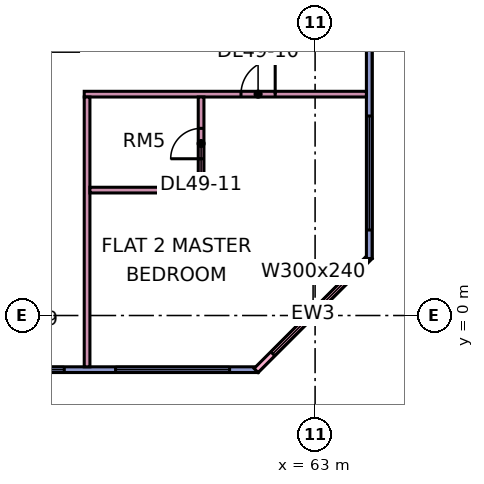
"""IFC4 building model, lengths in metres.
Left out: names, types, materials, properties, quantities, classifications, styles, units other than length and angle.
Written with IfcOpenShell. Run it as: python <this file> out.ifc"""

import sys

from ifc_helpers import new_model, si_unit, direction, frame, frame_2d, origin, place, context, subcontext, project, spatial, rectangle, extrude, element, fill, save


model = new_model("IFC4")
c1 = context("Model", 3, precision=1e-05, world=origin(), true_north=direction((0.0, 1.0)))
c2 = subcontext(c1, "Body", "Model", "MODEL_VIEW")
j1 = project(units=[si_unit("LENGTHUNIT", "METRE"), si_unit("PLANEANGLEUNIT", "RADIAN")], contexts=[c1])
p1 = place(None, origin())
s1 = spatial("IfcSite", under=j1, at=p1, CompositionType="ELEMENT")
p2 = place(p1, origin())
s2 = spatial("IfcBuilding", under=s1, at=p2, CompositionType="ELEMENT")
p3 = place(p2, frame((0.0, 0.0, 211.65)))
s3 = spatial("IfcBuildingStorey", under=s2, at=p3, CompositionType="ELEMENT", Elevation=211.65)
p4 = place(p3, frame((48.075, -1.425, 0.0), z_axis=(0.0, 0.0, 1.0), x_axis=(1.0, 0.0, 0.0)))
e1 = element("IfcWall", 1, at=p4, inside=s3, PredefinedType="SOLIDWALL", context=c2, shape_type="SweptSolid", body=[
    extrude(rectangle(XDim=13.425, YDim=0.15, at=frame_2d((6.712, 0.0))), origin(), (0.0, 0.0, 1.0), 3.35),
])
p5 = place(p4, frame((0.562, 0.0, 0.45)))
e2 = element("IfcOpeningElement", 2, at=p5, cuts=e1, PredefinedType="OPENING", context=c2, shape_type="SweptSolid", body=[
    extrude(rectangle(XDim=1.8, YDim=2.4, at=frame_2d((0.9, 1.2))), frame((0.0, 0.085, 0.0), z_axis=(0.0, -1.0, 0.0), x_axis=(1.0, 0.0, 0.0)), (0.0, 0.0, 1.0), 0.17),
])
p6 = place(p4, frame((3.525, 0.0, 0.45)))
e3 = element("IfcOpeningElement", 3, at=p6, cuts=e1, PredefinedType="OPENING", context=c2, shape_type="SweptSolid", body=[
    extrude(rectangle(XDim=4.8, YDim=2.4, at=frame_2d((2.4, 1.2))), frame((0.0, 0.085, 0.0), z_axis=(0.0, -1.0, 0.0), x_axis=(1.0, 0.0, 0.0)), (0.0, 0.0, 1.0), 0.17),
])
p7 = place(p4, frame((9.675, 0.0, 0.45)))
e4 = element("IfcOpeningElement", 4, at=p7, cuts=e1, PredefinedType="OPENING", context=c2, shape_type="SweptSolid", body=[
    extrude(rectangle(XDim=3.0, YDim=2.4, at=frame_2d((1.5, 1.2))), frame((0.0, 0.085, 0.0), z_axis=(0.0, -1.0, 0.0), x_axis=(1.0, 0.0, 0.0)), (0.0, 0.0, 1.0), 0.17),
])
p8 = place(p3, frame((61.447, -1.447, 0.0), z_axis=(0.0, 0.0, 1.0), x_axis=(0.707106781187, 0.707106781187, 0.0)))
e5 = element("IfcWall", 5, at=p8, inside=s3, PredefinedType="SOLIDWALL", context=c2, shape_type="SweptSolid", body=[
    extrude(rectangle(XDim=4.243, YDim=0.15, at=frame_2d((2.121, 0.0))), origin(), (0.0, 0.0, 1.0), 3.35),
])
p9 = place(p8, frame((0.621, 0.0, 0.45)))
e6 = element("IfcOpeningElement", 6, at=p9, cuts=e5, PredefinedType="OPENING", context=c2, shape_type="SweptSolid", body=[
    extrude(rectangle(XDim=3.0, YDim=2.4, at=frame_2d((1.5, 1.2))), frame((0.0, 0.085, 0.0), z_axis=(0.0, -1.0, 0.0), x_axis=(1.0, 0.0, 0.0)), (0.0, 0.0, 1.0), 0.17),
])
p10 = place(p3, frame((64.425, 1.5, 0.0), z_axis=(0.0, 0.0, 1.0), x_axis=(0.0, 1.0, 0.0)))
e7 = element("IfcWall", 7, at=p10, inside=s3, PredefinedType="SOLIDWALL", context=c2, shape_type="SweptSolid", body=[
    extrude(rectangle(XDim=10.425, YDim=0.15, at=frame_2d((5.212, 0.0))), origin(), (0.0, 0.0, 1.0), 3.35),
])
p11 = place(p10, frame((0.75, 0.0, 0.45)))
e8 = element("IfcOpeningElement", 8, at=p11, cuts=e7, PredefinedType="OPENING", context=c2, shape_type="SweptSolid", body=[
    extrude(rectangle(XDim=3.0, YDim=2.4, at=frame_2d((1.5, 1.2))), frame((0.0, 0.085, 0.0), z_axis=(0.0, -1.0, 0.0), x_axis=(1.0, 0.0, 0.0)), (0.0, 0.0, 1.0), 0.17),
])
p12 = place(p3, frame((56.925, 5.825, 0.0), z_axis=(0.0, 0.0, 1.0), x_axis=(1.0, 0.0, 0.0)))
e9 = element("IfcWall", 9, at=p12, inside=s3, PredefinedType="PARTITIONING", context=c2, shape_type="SweptSolid", body=[
    extrude(rectangle(XDim=7.425, YDim=0.15, at=frame_2d((3.712, 0.0))), origin(), (0.0, 0.0, 1.0), 3.35),
])
p13 = place(p12, frame((4.125, 0.0, 0.0)))
e10 = element("IfcOpeningElement", 10, at=p13, cuts=e9, PredefinedType="OPENING", context=c2, shape_type="SweptSolid", body=[
    extrude(rectangle(XDim=0.9, YDim=2.1, at=frame_2d((0.45, 1.05))), frame((0.0, 0.085, 0.0), z_axis=(0.0, -1.0, 0.0), x_axis=(1.0, 0.0, 0.0)), (0.0, 0.0, 1.0), 0.17),
])
p14 = place(p3, frame((57.0, -1.35, 0.0), z_axis=(0.0, 0.0, 1.0), x_axis=(0.0, 1.0, 0.0)))
e11 = element("IfcWall", 11, at=p14, inside=s3, PredefinedType="PARTITIONING", context=c2, shape_type="SweptSolid", body=[
    extrude(rectangle(XDim=7.1, YDim=0.15, at=frame_2d((3.55, 0.0))), origin(), (0.0, 0.0, 1.0), 3.35),
])
p15 = place(p3, frame((57.075, 3.3, 0.0), z_axis=(0.0, 0.0, 1.0), x_axis=(1.0, 0.0, 0.0)))
e12 = element("IfcWall", 12, at=p15, inside=s3, PredefinedType="PARTITIONING", context=c2, shape_type="SweptSolid", body=[
    extrude(rectangle(XDim=3.0, YDim=0.15, at=frame_2d((1.5, 0.0))), origin(), (0.0, 0.0, 1.0), 3.35),
])
p16 = place(p3, frame((60.0, 3.375, 0.0), z_axis=(0.0, 0.0, 1.0), x_axis=(0.0, 1.0, 0.0)))
e13 = element("IfcWall", 13, at=p16, inside=s3, PredefinedType="PARTITIONING", context=c2, shape_type="SweptSolid", body=[
    extrude(rectangle(XDim=2.375, YDim=0.15, at=frame_2d((1.188, 0.0))), origin(), (0.0, 0.0, 1.0), 3.35),
])
p17 = place(p16, frame((0.75, 0.0, 0.0)))
e14 = element("IfcOpeningElement", 14, at=p17, cuts=e13, PredefinedType="OPENING", context=c2, shape_type="SweptSolid", body=[
    extrude(rectangle(XDim=0.8, YDim=2.1, at=frame_2d((0.4, 1.05))), frame((0.0, 0.085, 0.0), z_axis=(0.0, -1.0, 0.0), x_axis=(1.0, 0.0, 0.0)), (0.0, 0.0, 1.0), 0.17),
])
p18 = place(p6, origin())
e15 = element("IfcWindow", 15, at=p18, inside=s3, PartitioningType="SINGLE_PANEL", PredefinedType="WINDOW", context=c2, shape_type="SweptSolid", body=[
    extrude(rectangle(XDim=4.8, YDim=2.4, at=frame_2d((2.4, 1.2))), frame((0.0, 0.03, 0.0), z_axis=(0.0, -1.0, 0.0), x_axis=(1.0, 0.0, 0.0)), (0.0, 0.0, 1.0), 0.06),
])
fill(e3, e15)
p19 = place(p7, origin())
e16 = element("IfcWindow", 16, at=p19, inside=s3, PartitioningType="SINGLE_PANEL", PredefinedType="WINDOW", context=c2, shape_type="SweptSolid", body=[
    extrude(rectangle(XDim=3.0, YDim=2.4, at=frame_2d((1.5, 1.2))), frame((0.0, 0.03, 0.0), z_axis=(0.0, -1.0, 0.0), x_axis=(1.0, 0.0, 0.0)), (0.0, 0.0, 1.0), 0.06),
])
fill(e4, e16)
p20 = place(p9, origin())
e17 = element("IfcWindow", 17, at=p20, inside=s3, PartitioningType="SINGLE_PANEL", PredefinedType="WINDOW", context=c2, shape_type="SweptSolid", body=[
    extrude(rectangle(XDim=3.0, YDim=2.4, at=frame_2d((1.5, 1.2))), frame((0.0, 0.03, 0.0), z_axis=(0.0, -1.0, 0.0), x_axis=(1.0, 0.0, 0.0)), (0.0, 0.0, 1.0), 0.06),
])
fill(e6, e17)
p21 = place(p11, origin())
e18 = element("IfcWindow", 18, at=p21, inside=s3, PartitioningType="SINGLE_PANEL", PredefinedType="WINDOW", context=c2, shape_type="SweptSolid", body=[
    extrude(rectangle(XDim=3.0, YDim=2.4, at=frame_2d((1.5, 1.2))), frame((0.0, 0.03, 0.0), z_axis=(0.0, -1.0, 0.0), x_axis=(1.0, 0.0, 0.0)), (0.0, 0.0, 1.0), 0.06),
])
fill(e8, e18)
p22 = place(p13, frame((0.9, 0.0, 0.0), z_axis=(0.0, 0.0, 1.0), x_axis=(-1.0, 0.0, 0.0)))
e19 = element("IfcDoor", 19, at=p22, inside=s3, OperationType="SINGLE_SWING_RIGHT", PredefinedType="DOOR", context=c2, shape_type="SweptSolid", body=[
    extrude(rectangle(XDim=0.9, YDim=2.1, at=frame_2d((0.45, 1.05))), frame((0.0, 0.025, 0.0), z_axis=(0.0, -1.0, 0.0), x_axis=(1.0, 0.0, 0.0)), (0.0, 0.0, 1.0), 0.05),
])
fill(e10, e19)
p23 = place(p17, origin())
e20 = element("IfcDoor", 20, at=p23, inside=s3, OperationType="SINGLE_SWING_LEFT", PredefinedType="DOOR", context=c2, shape_type="SweptSolid", body=[
    extrude(rectangle(XDim=0.8, YDim=2.1, at=frame_2d((0.4, 1.05))), frame((0.0, 0.025, 0.0), z_axis=(0.0, -1.0, 0.0), x_axis=(1.0, 0.0, 0.0)), (0.0, 0.0, 1.0), 0.05),
])
fill(e14, e20)
save(model, sys.argv[1])
